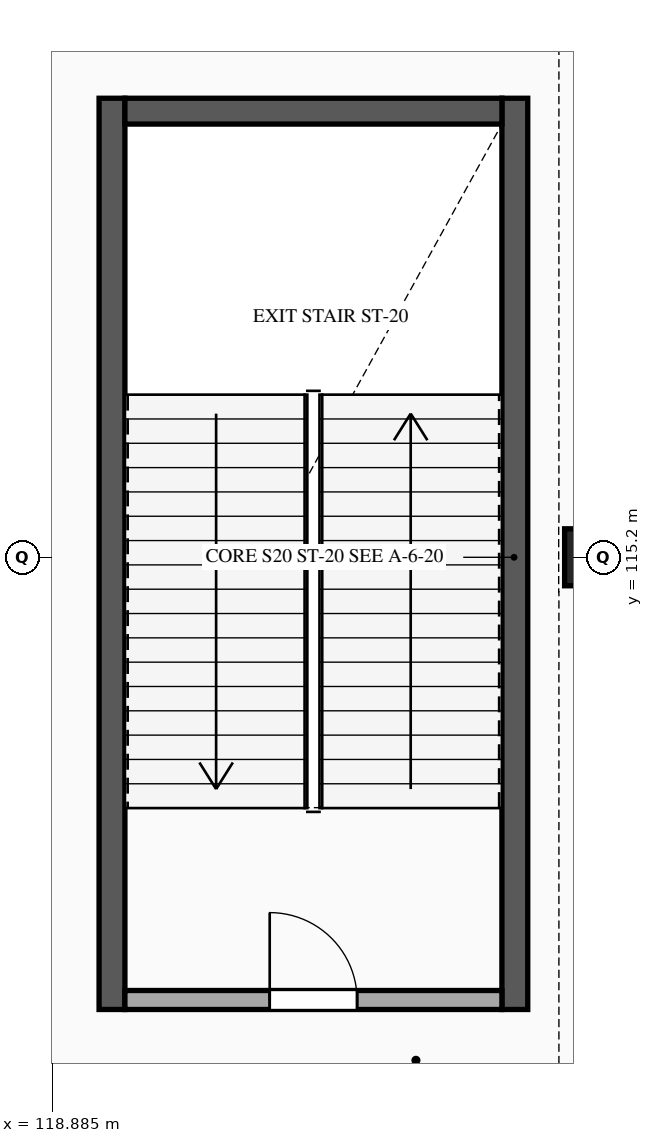
"""IFC4 building model, lengths in metres.
Left out: names, types, materials, properties, quantities, classifications, styles, units other than length and angle.
Written with IfcOpenShell. Run it as: python <this file> out.ifc"""

import sys

from ifc_helpers import new_model, si_unit, direction, frame, frame_2d, origin, origin_2d, place, context, subcontext, project, spatial, rectangle, extrude, element, fill, save


model = new_model("IFC4")
c1 = context("Model", 3, precision=1e-05, world=origin(), true_north=direction((0.0, 1.0)))
c2 = subcontext(c1, "Body", "Model", "MODEL_VIEW")
j1 = project(units=[si_unit("LENGTHUNIT", "METRE"), si_unit("PLANEANGLEUNIT", "RADIAN")], contexts=[c1])
p1 = place(None, origin())
s1 = spatial("IfcSite", under=j1, at=p1, CompositionType="ELEMENT")
p2 = place(p1, origin())
s2 = spatial("IfcBuilding", under=s1, at=p2, CompositionType="ELEMENT")
p3 = place(p2, frame((0.0, 0.0, 5.4)))
s3 = spatial("IfcBuildingStorey", under=s2, at=p3, CompositionType="ELEMENT", Elevation=5.4)
p4 = place(p3, frame((126.0, 115.2, 0.0), z_axis=(0.0, 0.0, 1.0), x_axis=(1.0, 0.0, 0.0)))
e1 = element("IfcColumn", 1, at=p4, inside=s3, PredefinedType="COLUMN", context=c2, shape_type="SweptSolid", body=[
    extrude(rectangle(XDim=0.75, YDim=0.75, at=origin_2d()), origin(), (0.0, 0.0, 1.0), 5.4),
])
for number, where, z_axis, x_axis in (
    (2, (119.67, 109.25, 0.0), (0.0, 0.0, 1.0), (0.0, 1.0, 0.0)),
    (3, (124.97, 121.24, 0.0), (0.0, 0.0, 1.0), (0.0, -1.0, 0.0)),
):
    element("IfcWall", number, at=place(p3, frame(where, z_axis=z_axis, x_axis=x_axis)), inside=s3, PredefinedType="SHEAR", context=c2, shape_type="SweptSolid", body=[
        extrude(rectangle(XDim=11.99, YDim=0.34, at=frame_2d((5.995, 0.0))), origin(), (0.0, 0.0, 1.0), 5.12),
    ])
p5 = place(p3, frame((119.84, 121.07, 0.0), z_axis=(0.0, 0.0, 1.0), x_axis=(1.0, 0.0, 0.0)))
e4 = element("IfcWall", 4, at=p5, inside=s3, PredefinedType="SHEAR", context=c2, shape_type="SweptSolid", body=[
    extrude(rectangle(XDim=4.96, YDim=0.34, at=frame_2d((2.48, 0.0))), origin(), (0.0, 0.0, 1.0), 5.12),
])
p6 = place(p3, frame((119.84, 109.375, 0.0), z_axis=(0.0, 0.0, 1.0), x_axis=(1.0, 0.0, 0.0)))
e5 = element("IfcWall", 5, at=p6, inside=s3, PredefinedType="STANDARD", context=c2, shape_type="SweptSolid", body=[
    extrude(rectangle(XDim=4.96, YDim=0.25, at=frame_2d((2.48, 0.0))), origin(), (0.0, 0.0, 1.0), 5.12),
])
p7 = place(p6, frame((1.905, 0.0, 0.0)))
e6 = element("IfcOpeningElement", 6, at=p7, cuts=e5, PredefinedType="OPENING", context=c2, shape_type="SweptSolid", body=[
    extrude(rectangle(XDim=1.15, YDim=2.2, at=frame_2d((0.575, 1.1))), frame((0.0, 0.135, 0.0), z_axis=(0.0, -1.0, 0.0), x_axis=(1.0, 0.0, 0.0)), (0.0, 0.0, 1.0), 0.27),
])
p8 = place(p7, origin())
e7 = element("IfcDoor", 7, at=p8, inside=s3, OperationType="SINGLE_SWING_LEFT", PredefinedType="DOOR", context=c2, shape_type="SweptSolid", body=[
    extrude(rectangle(XDim=1.15, YDim=2.2, at=frame_2d((0.575, 1.1))), frame((0.0, 0.025, 0.0), z_axis=(0.0, -1.0, 0.0), x_axis=(1.0, 0.0, 0.0)), (0.0, 0.0, 1.0), 0.05),
])
fill(e6, e7)
save(model, sys.argv[1])
